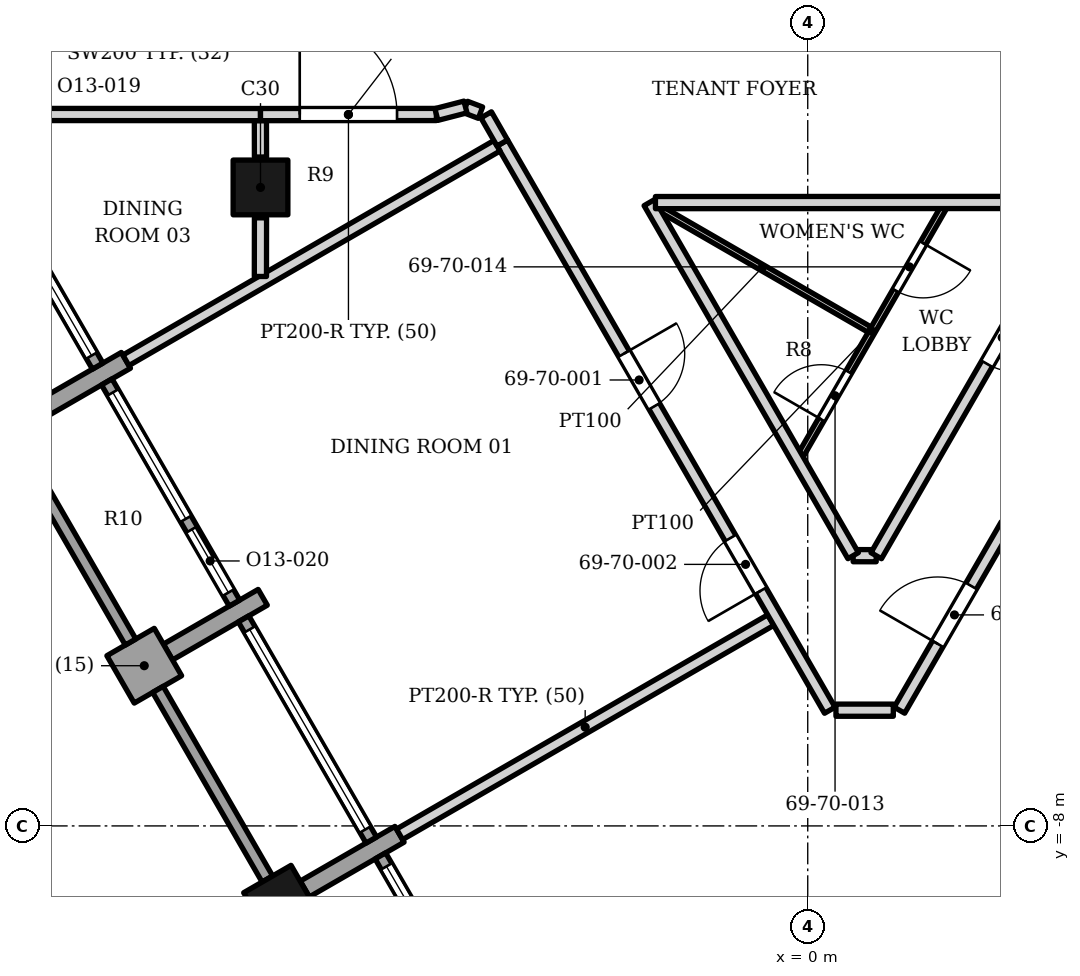
"""IFC4 building model, lengths in metres.
Left out: names, types, materials, properties, quantities, classifications, styles, units other than length and angle.
Written with IfcOpenShell. Run it as: python <this file> out.ifc"""

import sys

from ifc_helpers import new_model, si_unit, direction, frame, frame_2d, origin, origin_2d, place, context, subcontext, project, spatial, rectangle, extrude, element, fill, save


model = new_model("IFC4")
c1 = context("Model", 3, precision=1e-05, world=origin(), true_north=direction((0.0, 1.0)))
c2 = subcontext(c1, "Body", "Model", "MODEL_VIEW")
j1 = project(units=[si_unit("LENGTHUNIT", "METRE"), si_unit("PLANEANGLEUNIT", "RADIAN")], contexts=[c1])
p1 = place(None, origin())
s1 = spatial("IfcSite", under=j1, at=p1, CompositionType="ELEMENT")
p2 = place(p1, origin())
s2 = spatial("IfcBuilding", under=s1, at=p2, CompositionType="ELEMENT")
p3 = place(p2, frame((0.0, 0.0, 287.2)))
s3 = spatial("IfcBuildingStorey", under=s2, at=p3, CompositionType="ELEMENT", Elevation=287.2)
for number, where, z_axis, x_axis in (
    (1, (-9.0, 2.5, 0.0), (0.0, 0.0, 1.0), (1.0, 0.0, 0.0)),
    (2, (-8.662, -9.263, 0.0), (0.0, 0.0, 1.0), (0.5, -0.866, 0.0)),
):
    element("IfcColumn", number, at=place(p3, frame(where, z_axis=z_axis, x_axis=x_axis)), inside=s3, PredefinedType="COLUMN", context=c2, shape_type="SweptSolid", body=[
        extrude(rectangle(XDim=0.9, YDim=0.9, at=origin_2d()), origin(), (0.0, 0.0, 1.0), 3.9),
    ])
p4 = place(p3, frame((-12.772, -1.243, 0.0), z_axis=(0.0, 0.0, 1.0), x_axis=(0.866013897511, 0.50001992892, 0.0)))
e3 = element("IfcWall", 3, at=p4, inside=s3, PredefinedType="SOLIDWALL", context=c2, shape_type="SweptSolid", body=[
    extrude(rectangle(XDim=1.8, YDim=0.3, at=frame_2d((0.9, 0.0))), origin(), (0.0, 0.0, 1.0), 3.0),
])
p5 = place(p3, frame((-11.137, -4.976, 0.0), z_axis=(0.0, 0.0, 1.0), x_axis=(0.500223362819, -0.865896406789, 0.0)))
e4 = element("IfcWall", 4, at=p5, inside=s3, PredefinedType="SOLIDWALL", context=c2, shape_type="SweptSolid", body=[
    extrude(rectangle(XDim=0.9, YDim=0.9, at=frame_2d((0.45, 0.0))), origin(), (0.0, 0.0, 1.0), 3.0),
])
p6 = place(p3, frame((-10.522, -5.14, 0.0), z_axis=(0.0, 0.0, 1.0), x_axis=(0.866047807691, 0.499961193289, 0.0)))
e5 = element("IfcWall", 5, at=p6, inside=s3, PredefinedType="SOLIDWALL", context=c2, shape_type="SweptSolid", body=[
    extrude(rectangle(XDim=1.8, YDim=0.3, at=frame_2d((0.9, 0.0))), origin(), (0.0, 0.0, 1.0), 3.0),
])
p7 = place(p3, frame((-6.713, -8.138, 0.0), z_axis=(0.0, 0.0, 1.0), x_axis=(-0.866047807691, -0.499961193289, 0.0)))
e6 = element("IfcWall", 6, at=p7, inside=s3, PredefinedType="SOLIDWALL", context=c2, shape_type="SweptSolid", body=[
    extrude(rectangle(XDim=1.8, YDim=0.3, at=frame_2d((0.9, 0.0))), origin(), (0.0, 0.0, 1.0), 2.742),
])
p8 = place(p3, frame((-13.778, 3.199, 0.0), z_axis=(0.0, 0.0, 1.0), x_axis=(0.500027713859, -0.866009402589, 0.0)))
e7 = element("IfcWall", 7, at=p8, inside=s3, PredefinedType="ELEMENTEDWALL", context=c2, shape_type="SweptSolid", body=[
    extrude(rectangle(XDim=4.2, YDim=0.2, at=frame_2d((2.1, 0.0))), origin(), (0.0, 0.0, 1.0), 3.0),
])
p9 = place(p8, frame((0.2, 0.0, 0.45)))
e8 = element("IfcOpeningElement", 8, at=p9, cuts=e7, PredefinedType="OPENING", context=c2, shape_type="SweptSolid", body=[
    extrude(rectangle(XDim=3.8, YDim=2.25, at=frame_2d((1.9, 1.125))), frame((0.0, 0.11, 0.0), z_axis=(0.0, -1.0, 0.0), x_axis=(1.0, 0.0, 0.0)), (0.0, 0.0, 1.0), 0.22),
])
p10 = place(p3, frame((-12.937, -1.858, 0.0), z_axis=(0.0, 0.0, 1.0), x_axis=(0.499961193289, -0.866047807691, 0.0)))
e9 = element("IfcWall", 9, at=p10, inside=s3, PredefinedType="SOLIDWALL", context=c2, shape_type="SweptSolid", body=[
    extrude(rectangle(XDim=3.6, YDim=0.2, at=frame_2d((1.8, 0.0))), origin(), (0.0, 0.0, 1.0), 3.0),
])
p11 = place(p3, frame((-11.528, -0.698, 0.0), z_axis=(0.0, 0.0, 1.0), x_axis=(0.500002543286, -0.866023935413, 0.0)))
e10 = element("IfcWall", 10, at=p11, inside=s3, PredefinedType="ELEMENTEDWALL", context=c2, shape_type="SweptSolid", body=[
    extrude(rectangle(XDim=4.2, YDim=0.2, at=frame_2d((2.1, 0.0))), origin(), (0.0, 0.0, 1.0), 3.0),
])
p12 = place(p11, frame((0.2, 0.0, 0.45)))
e11 = element("IfcOpeningElement", 11, at=p12, cuts=e10, PredefinedType="OPENING", context=c2, shape_type="SweptSolid", body=[
    extrude(rectangle(XDim=2.4, YDim=2.25, at=frame_2d((1.2, 1.125))), frame((0.0, 0.11, 0.0), z_axis=(0.0, -1.0, 0.0), x_axis=(1.0, 0.0, 0.0)), (0.0, 0.0, 1.0), 0.22),
])
p13 = place(p11, frame((2.8, 0.0, 0.0)))
e12 = element("IfcOpeningElement", 12, at=p13, cuts=e10, PredefinedType="OPENING", context=c2, shape_type="SweptSolid", body=[
    extrude(rectangle(XDim=1.2, YDim=2.7, at=frame_2d((0.6, 1.35))), frame((0.0, 0.11, 0.0), z_axis=(0.0, -1.0, 0.0), x_axis=(1.0, 0.0, 0.0)), (0.0, 0.0, 1.0), 0.22),
])
p14 = place(p3, frame((-10.687, -5.755, 0.0), z_axis=(0.0, 0.0, 1.0), x_axis=(0.499961193289, -0.866047807691, 0.0)))
e13 = element("IfcWall", 13, at=p14, inside=s3, PredefinedType="SOLIDWALL", context=c2, shape_type="SweptSolid", body=[
    extrude(rectangle(XDim=3.6, YDim=0.2, at=frame_2d((1.8, 0.0))), origin(), (0.0, 0.0, 1.0), 3.0),
])
p15 = place(p3, frame((-9.278, -4.595, 0.0), z_axis=(0.0, 0.0, 1.0), x_axis=(0.500027713859, -0.866009402589, 0.0)))
e14 = element("IfcWall", 14, at=p15, inside=s3, PredefinedType="ELEMENTEDWALL", context=c2, shape_type="SweptSolid", body=[
    extrude(rectangle(XDim=4.2, YDim=0.2, at=frame_2d((2.1, 0.0))), origin(), (0.0, 0.0, 1.0), 3.0),
])
p16 = place(p15, frame((0.2, 0.0, 0.45)))
e15 = element("IfcOpeningElement", 15, at=p16, cuts=e14, PredefinedType="OPENING", context=c2, shape_type="SweptSolid", body=[
    extrude(rectangle(XDim=3.8, YDim=2.25, at=frame_2d((1.9, 1.125))), frame((0.0, 0.11, 0.0), z_axis=(0.0, -1.0, 0.0), x_axis=(1.0, 0.0, 0.0)), (0.0, 0.0, 1.0), 0.22),
])
p17 = place(p3, frame((-7.028, -8.492, 0.0), z_axis=(0.0, 0.0, 1.0), x_axis=(0.500002543286, -0.866023935413, 0.0)))
e16 = element("IfcWall", 16, at=p17, inside=s3, PredefinedType="ELEMENTEDWALL", context=c2, shape_type="SweptSolid", body=[
    extrude(rectangle(XDim=4.2, YDim=0.2, at=frame_2d((2.1, 0.0))), origin(), (0.0, 0.0, 1.0), 2.742),
])
p18 = place(p17, frame((0.2, 0.0, 0.45)))
e17 = element("IfcOpeningElement", 17, at=p18, cuts=e16, PredefinedType="OPENING", context=c2, shape_type="SweptSolid", body=[
    extrude(rectangle(XDim=2.4, YDim=2.19, at=frame_2d((1.2, 1.095))), frame((0.0, 0.11, 0.0), z_axis=(0.0, -1.0, 0.0), x_axis=(1.0, 0.0, 0.0)), (0.0, 0.0, 1.0), 0.22),
])
p19 = place(p17, frame((2.8, 0.0, 0.0)))
e18 = element("IfcOpeningElement", 18, at=p19, cuts=e16, PredefinedType="OPENING", context=c2, shape_type="SweptSolid", body=[
    extrude(rectangle(XDim=1.2, YDim=2.64, at=frame_2d((0.6, 1.32))), frame((0.0, 0.11, 0.0), z_axis=(0.0, -1.0, 0.0), x_axis=(1.0, 0.0, 0.0)), (0.0, 0.0, 1.0), 0.22),
])
p20 = place(p3, frame((-6.713, -8.138, 0.0), z_axis=(0.0, 0.0, 1.0), x_axis=(0.86611466028, 0.499845371339, 0.0)))
e19 = element("IfcWall", 19, at=p20, inside=s3, PredefinedType="PARTITIONING", context=c2, shape_type="SweptSolid", body=[
    extrude(rectangle(XDim=7.05, YDim=0.2, at=frame_2d((3.525, 0.0))), origin(), (0.0, 0.0, 1.0), 2.742),
])
p21 = place(p3, frame((-5.023, 3.231, 0.0), z_axis=(0.0, 0.0, 1.0), x_axis=(0.499993215683, -0.866029320676, 0.0)))
e20 = element("IfcWall", 20, at=p21, inside=s3, PredefinedType="PARTITIONING", context=c2, shape_type="SweptSolid", body=[
    extrude(rectangle(XDim=10.771, YDim=0.2, at=frame_2d((5.386, 0.0))), origin(), (0.0, 0.0, 1.0), 2.742),
])
p22 = place(p21, frame((4.0, 0.0, 0.0)))
e21 = element("IfcOpeningElement", 21, at=p22, cuts=e20, PredefinedType="OPENING", context=c2, shape_type="SweptSolid", body=[
    extrude(rectangle(XDim=1.0, YDim=2.1, at=frame_2d((0.5, 1.05))), frame((0.0, 0.11, 0.0), z_axis=(0.0, -1.0, 0.0), x_axis=(1.0, 0.0, 0.0)), (0.0, 0.0, 1.0), 0.22),
])
p23 = place(p21, frame((7.502, 0.0, 0.0)))
e22 = element("IfcOpeningElement", 22, at=p23, cuts=e20, PredefinedType="OPENING", context=c2, shape_type="SweptSolid", body=[
    extrude(rectangle(XDim=1.0, YDim=2.1, at=frame_2d((0.5, 1.05))), frame((0.0, 0.11, 0.0), z_axis=(0.0, -1.0, 0.0), x_axis=(1.0, 0.0, 0.0)), (0.0, 0.0, 1.0), 0.22),
])
p24 = place(p3, frame((0.464, -6.097, 0.0), z_axis=(0.0, 0.0, 1.0), x_axis=(0.999999966529, -0.000258732204, 0.0)))
e23 = element("IfcWall", 23, at=p24, inside=s3, PredefinedType="PARTITIONING", context=c2, shape_type="SweptSolid", body=[
    extrude(rectangle(XDim=0.944, YDim=0.2, at=frame_2d((0.472, 0.0))), origin(), (0.0, 0.0, 1.0), 3.73),
])
p25 = place(p3, frame((1.508, -6.097, 0.0), z_axis=(0.0, 0.0, 1.0), x_axis=(0.500420898521, 0.865782261497, 0.0)))
e24 = element("IfcWall", 24, at=p25, inside=s3, PredefinedType="PARTITIONING", context=c2, shape_type="SweptSolid", body=[
    extrude(rectangle(XDim=3.52, YDim=0.2, at=frame_2d((1.76, 0.0))), origin(), (0.0, 0.0, 1.0), 2.742),
])
p26 = place(p25, frame((1.26, 0.0, 0.0)))
e25 = element("IfcOpeningElement", 25, at=p26, cuts=e24, PredefinedType="OPENING", context=c2, shape_type="SweptSolid", body=[
    extrude(rectangle(XDim=1.1, YDim=2.1, at=frame_2d((0.55, 1.05))), frame((0.0, 0.11, 0.0), z_axis=(0.0, -1.0, 0.0), x_axis=(1.0, 0.0, 0.0)), (0.0, 0.0, 1.0), 0.22),
])
p27 = place(p3, frame((0.747, -3.555, 0.0), z_axis=(0.0, 0.0, 1.0), x_axis=(0.999996683004, -0.002575651469, 0.0)))
e26 = element("IfcWall", 26, at=p27, inside=s3, PredefinedType="PARTITIONING", context=c2, shape_type="SweptSolid", body=[
    extrude(rectangle(XDim=0.379, YDim=0.2, at=frame_2d((0.189, 0.0))), origin(), (0.0, 0.0, 1.0), 3.73),
])
p28 = place(p3, frame((1.126, -3.556, 0.0), z_axis=(0.0, 0.0, 1.0), x_axis=(0.500008091576, 0.86602073206, 0.0)))
e27 = element("IfcWall", 27, at=p28, inside=s3, PredefinedType="PARTITIONING", context=c2, shape_type="SweptSolid", body=[
    extrude(rectangle(XDim=8.286, YDim=0.2, at=frame_2d((4.143, 0.0))), origin(), (0.0, 0.0, 1.0), 2.742),
])
p29 = place(p28, frame((3.643, 0.0, 0.0)))
e28 = element("IfcOpeningElement", 28, at=p29, cuts=e27, PredefinedType="OPENING", context=c2, shape_type="SweptSolid", body=[
    extrude(rectangle(XDim=1.0, YDim=2.1, at=frame_2d((0.5, 1.05))), frame((0.0, 0.11, 0.0), z_axis=(0.0, -1.0, 0.0), x_axis=(1.0, 0.0, 0.0)), (0.0, 0.0, 1.0), 0.22),
])
p30 = place(p3, frame((-0.112, -1.898, 0.0), z_axis=(0.0, 0.0, 1.0), x_axis=(0.499971624425, 0.866041785811, 0.0)))
e29 = element("IfcWall", 29, at=p30, inside=s3, PredefinedType="PARTITIONING", context=c2, shape_type="SweptSolid", body=[
    extrude(rectangle(XDim=4.693, YDim=0.1, at=frame_2d((2.347, 0.0))), origin(), (0.0, 0.0, 1.0), 2.742),
])
p31 = place(p30, frame((0.673, 0.0, 0.0)))
e30 = element("IfcOpeningElement", 30, at=p31, cuts=e29, PredefinedType="OPENING", context=c2, shape_type="SweptSolid", body=[
    extrude(rectangle(XDim=0.9, YDim=2.1, at=frame_2d((0.45, 1.05))), frame((0.0, 0.06, 0.0), z_axis=(0.0, -1.0, 0.0), x_axis=(1.0, 0.0, 0.0)), (0.0, 0.0, 1.0), 0.12),
])
p32 = place(p30, frame((3.12, 0.0, 0.0)))
e31 = element("IfcOpeningElement", 31, at=p32, cuts=e29, PredefinedType="OPENING", context=c2, shape_type="SweptSolid", body=[
    extrude(rectangle(XDim=0.9, YDim=2.1, at=frame_2d((0.45, 1.05))), frame((0.0, 0.06, 0.0), z_axis=(0.0, -1.0, 0.0), x_axis=(1.0, 0.0, 0.0)), (0.0, 0.0, 1.0), 0.12),
])
p33 = place(p3, frame((-11.214, -0.343, 0.0), z_axis=(0.0, 0.0, 1.0), x_axis=(0.86573436217, 0.500503760384, 0.0)))
e32 = element("IfcWall", 32, at=p33, inside=s3, PredefinedType="PARTITIONING", context=c2, shape_type="SweptSolid", body=[
    extrude(rectangle(XDim=7.05, YDim=0.2, at=frame_2d((3.525, 0.0))), origin(), (0.0, 0.0, 1.0), 2.742),
])
p34 = place(p3, frame((-9.002, 1.036, 0.0), z_axis=(0.0, 0.0, 1.0), x_axis=(0.001518985589, 0.999998846341, 0.0)))
e33 = element("IfcWall", 33, at=p34, inside=s3, PredefinedType="PARTITIONING", context=c2, shape_type="SweptSolid", body=[
    extrude(rectangle(XDim=0.964, YDim=0.2, at=frame_2d((0.482, 0.0))), origin(), (0.0, 0.0, 1.0), 3.128),
])
p35 = place(p3, frame((-2.518, 2.202, 0.0), z_axis=(0.0, 0.0, 1.0), x_axis=(0.866034240187, -0.49998469459, 0.0)))
e34 = element("IfcWall", 34, at=p35, inside=s3, PredefinedType="PARTITIONING", context=c2, shape_type="SweptSolid", body=[
    extrude(rectangle(XDim=4.083, YDim=0.1, at=frame_2d((2.042, 0.0))), origin(), (0.0, 0.0, 1.0), 2.742),
])
p36 = place(p3, frame((-2.605, 2.25, 0.0), z_axis=(0.0, 0.0, 1.0), x_axis=(0.500000908097, -0.866024879494, 0.0)))
e35 = element("IfcWall", 35, at=p36, inside=s3, PredefinedType="PARTITIONING", context=c2, shape_type="SweptSolid", body=[
    extrude(rectangle(XDim=6.704, YDim=0.2, at=frame_2d((3.352, 0.0))), origin(), (0.0, 0.0, 1.0), 2.742),
])
p37 = place(p3, frame((-2.505, 2.25, 0.0), z_axis=(0.0, 0.0, 1.0), x_axis=(0.999999930765, 0.000372116074, 0.0)))
e36 = element("IfcWall", 36, at=p37, inside=s3, PredefinedType="PARTITIONING", context=c2, shape_type="SweptSolid", body=[
    extrude(rectangle(XDim=5.905, YDim=0.2, at=frame_2d((2.952, 0.0))), origin(), (0.0, 0.0, 1.0), 3.73),
])
p38 = place(p3, frame((-9.002, 3.6, 0.0), z_axis=(0.0, 0.0, 1.0), x_axis=(0.002442989453, -0.999997015897, 0.0)))
e37 = element("IfcWall", 37, at=p38, inside=s3, PredefinedType="PARTITIONING", context=c2, shape_type="SweptSolid", body=[
    extrude(rectangle(XDim=0.6, YDim=0.2, at=frame_2d((0.3, 0.0))), origin(), (0.0, 0.0, 1.0), 3.332),
])
p39 = place(p3, frame((-5.289, 3.694, 0.0), z_axis=(0.0, 0.0, 1.0), x_axis=(0.497517178185, -0.867454124096, 0.0)))
e38 = element("IfcWall", 38, at=p39, inside=s3, PredefinedType="PARTITIONING", context=c2, shape_type="SweptSolid", body=[
    extrude(rectangle(XDim=0.534, YDim=0.2, at=frame_2d((0.267, 0.0))), origin(), (0.0, 0.0, 1.0), 3.73),
])
p40 = place(p3, frame((-12.6, 3.699, 0.0), z_axis=(0.0, 0.0, 1.0), x_axis=(0.999999917209, -0.000406917565, 0.0)))
e39 = element("IfcWall", 39, at=p40, inside=s3, PredefinedType="PARTITIONING", context=c2, shape_type="SweptSolid", body=[
    extrude(rectangle(XDim=3.6, YDim=0.2, at=frame_2d((1.8, 0.0))), origin(), (0.0, 0.0, 1.0), 3.73),
])
p41 = place(p3, frame((-9.0, 3.698, 0.0), z_axis=(0.0, 0.0, 1.0), x_axis=(0.999999871794, 0.000506371781, 0.0)))
e40 = element("IfcWall", 40, at=p41, inside=s3, PredefinedType="PARTITIONING", context=c2, shape_type="SweptSolid", body=[
    extrude(rectangle(XDim=2.893, YDim=0.2, at=frame_2d((1.446, 0.0))), origin(), (0.0, 0.0, 1.0), 3.73),
])
p42 = place(p41, frame((0.646, 0.0, 0.0)))
e41 = element("IfcOpeningElement", 41, at=p42, cuts=e40, PredefinedType="OPENING", context=c2, shape_type="SweptSolid", body=[
    extrude(rectangle(XDim=1.6, YDim=2.1, at=frame_2d((0.8, 1.05))), frame((0.0, 0.11, 0.0), z_axis=(0.0, -1.0, 0.0), x_axis=(1.0, 0.0, 0.0)), (0.0, 0.0, 1.0), 0.22),
])
p43 = place(p3, frame((-5.629, 3.823, 0.0), z_axis=(0.0, 0.0, 1.0), x_axis=(0.93514551708, -0.354263830902, 0.0)))
e42 = element("IfcWall", 42, at=p43, inside=s3, PredefinedType="PARTITIONING", context=c2, shape_type="SweptSolid", body=[
    extrude(rectangle(XDim=0.264, YDim=0.2, at=frame_2d((0.132, 0.0))), origin(), (0.0, 0.0, 1.0), 3.73),
])
p44 = place(p3, frame((-6.107, 3.699, 0.0), z_axis=(0.0, 0.0, 1.0), x_axis=(0.968223295936, 0.250087283177, 0.0)))
e43 = element("IfcWall", 43, at=p44, inside=s3, PredefinedType="PARTITIONING", context=c2, shape_type="SweptSolid", body=[
    extrude(rectangle(XDim=0.494, YDim=0.2, at=frame_2d((0.247, 0.0))), origin(), (0.0, 0.0, 1.0), 3.73),
])
p45 = place(p9, origin())
e44 = element("IfcWindow", 44, at=p45, inside=s3, PartitioningType="SINGLE_PANEL", PredefinedType="WINDOW", context=c2, shape_type="SweptSolid", body=[
    extrude(rectangle(XDim=3.8, YDim=2.25, at=frame_2d((1.9, 1.125))), frame((0.0, 0.03, 0.0), z_axis=(0.0, -1.0, 0.0), x_axis=(1.0, 0.0, 0.0)), (0.0, 0.0, 1.0), 0.06),
])
fill(e8, e44)
p46 = place(p12, origin())
e45 = element("IfcWindow", 45, at=p46, inside=s3, PartitioningType="SINGLE_PANEL", PredefinedType="WINDOW", context=c2, shape_type="SweptSolid", body=[
    extrude(rectangle(XDim=2.4, YDim=2.25, at=frame_2d((1.2, 1.125))), frame((0.0, 0.03, 0.0), z_axis=(0.0, -1.0, 0.0), x_axis=(1.0, 0.0, 0.0)), (0.0, 0.0, 1.0), 0.06),
])
fill(e11, e45)
p47 = place(p13, origin())
e46 = element("IfcDoor", 46, at=p47, inside=s3, OperationType="SINGLE_SWING_LEFT", PredefinedType="DOOR", context=c2, shape_type="SweptSolid", body=[
    extrude(rectangle(XDim=1.2, YDim=2.7, at=frame_2d((0.6, 1.35))), frame((0.0, 0.025, 0.0), z_axis=(0.0, -1.0, 0.0), x_axis=(1.0, 0.0, 0.0)), (0.0, 0.0, 1.0), 0.05),
])
fill(e12, e46)
p48 = place(p16, origin())
e47 = element("IfcWindow", 47, at=p48, inside=s3, PartitioningType="SINGLE_PANEL", PredefinedType="WINDOW", context=c2, shape_type="SweptSolid", body=[
    extrude(rectangle(XDim=3.8, YDim=2.25, at=frame_2d((1.9, 1.125))), frame((0.0, 0.03, 0.0), z_axis=(0.0, -1.0, 0.0), x_axis=(1.0, 0.0, 0.0)), (0.0, 0.0, 1.0), 0.06),
])
fill(e15, e47)
p49 = place(p18, origin())
e48 = element("IfcWindow", 48, at=p49, inside=s3, PartitioningType="SINGLE_PANEL", PredefinedType="WINDOW", context=c2, shape_type="SweptSolid", body=[
    extrude(rectangle(XDim=2.4, YDim=2.19, at=frame_2d((1.2, 1.095))), frame((0.0, 0.03, 0.0), z_axis=(0.0, -1.0, 0.0), x_axis=(1.0, 0.0, 0.0)), (0.0, 0.0, 1.0), 0.06),
])
fill(e17, e48)
p50 = place(p22, origin())
e49 = element("IfcDoor", 49, at=p50, inside=s3, OperationType="SINGLE_SWING_LEFT", PredefinedType="DOOR", context=c2, shape_type="SweptSolid", body=[
    extrude(rectangle(XDim=1.0, YDim=2.1, at=frame_2d((0.5, 1.05))), frame((0.0, 0.025, 0.0), z_axis=(0.0, -1.0, 0.0), x_axis=(1.0, 0.0, 0.0)), (0.0, 0.0, 1.0), 0.05),
])
fill(e21, e49)
p51 = place(p23, origin())
e50 = element("IfcDoor", 50, at=p51, inside=s3, OperationType="SINGLE_SWING_RIGHT", PredefinedType="DOOR", context=c2, shape_type="SweptSolid", body=[
    extrude(rectangle(XDim=1.0, YDim=2.1, at=frame_2d((0.5, 1.05))), frame((0.0, 0.025, 0.0), z_axis=(0.0, -1.0, 0.0), x_axis=(1.0, 0.0, 0.0)), (0.0, 0.0, 1.0), 0.05),
])
fill(e22, e50)
p52 = place(p42, origin())
e51 = element("IfcDoor", 51, at=p52, inside=s3, OperationType="DOUBLE_DOOR_SINGLE_SWING", PredefinedType="DOOR", context=c2, shape_type="SweptSolid", body=[
    extrude(rectangle(XDim=1.6, YDim=2.1, at=frame_2d((0.8, 1.05))), frame((0.0, 0.025, 0.0), z_axis=(0.0, -1.0, 0.0), x_axis=(1.0, 0.0, 0.0)), (0.0, 0.0, 1.0), 0.05),
])
fill(e41, e51)
p53 = place(p26, origin())
e52 = element("IfcDoor", 52, at=p53, inside=s3, OperationType="SINGLE_SWING_LEFT", PredefinedType="DOOR", context=c2, shape_type="SweptSolid", body=[
    extrude(rectangle(XDim=1.1, YDim=2.1, at=frame_2d((0.55, 1.05))), frame((0.0, 0.025, 0.0), z_axis=(0.0, -1.0, 0.0), x_axis=(1.0, 0.0, 0.0)), (0.0, 0.0, 1.0), 0.05),
])
fill(e25, e52)
p54 = place(p29, origin())
e53 = element("IfcDoor", 53, at=p54, inside=s3, OperationType="SINGLE_SWING_RIGHT", PredefinedType="DOOR", context=c2, shape_type="SweptSolid", body=[
    extrude(rectangle(XDim=1.0, YDim=2.1, at=frame_2d((0.5, 1.05))), frame((0.0, 0.025, 0.0), z_axis=(0.0, -1.0, 0.0), x_axis=(1.0, 0.0, 0.0)), (0.0, 0.0, 1.0), 0.05),
])
fill(e28, e53)
p55 = place(p31, origin())
e54 = element("IfcDoor", 54, at=p55, inside=s3, OperationType="SINGLE_SWING_LEFT", PredefinedType="DOOR", context=c2, shape_type="SweptSolid", body=[
    extrude(rectangle(XDim=0.9, YDim=2.1, at=frame_2d((0.45, 1.05))), frame((0.0, 0.025, 0.0), z_axis=(0.0, -1.0, 0.0), x_axis=(1.0, 0.0, 0.0)), (0.0, 0.0, 1.0), 0.05),
])
fill(e30, e54)
p56 = place(p32, origin())
e55 = element("IfcDoor", 55, at=p56, inside=s3, OperationType="SINGLE_SWING_RIGHT", PredefinedType="DOOR", context=c2, shape_type="SweptSolid", body=[
    extrude(rectangle(XDim=0.9, YDim=2.1, at=frame_2d((0.45, 1.05))), frame((0.0, 0.025, 0.0), z_axis=(0.0, -1.0, 0.0), x_axis=(1.0, 0.0, 0.0)), (0.0, 0.0, 1.0), 0.05),
])
fill(e31, e55)
save(model, sys.argv[1])
